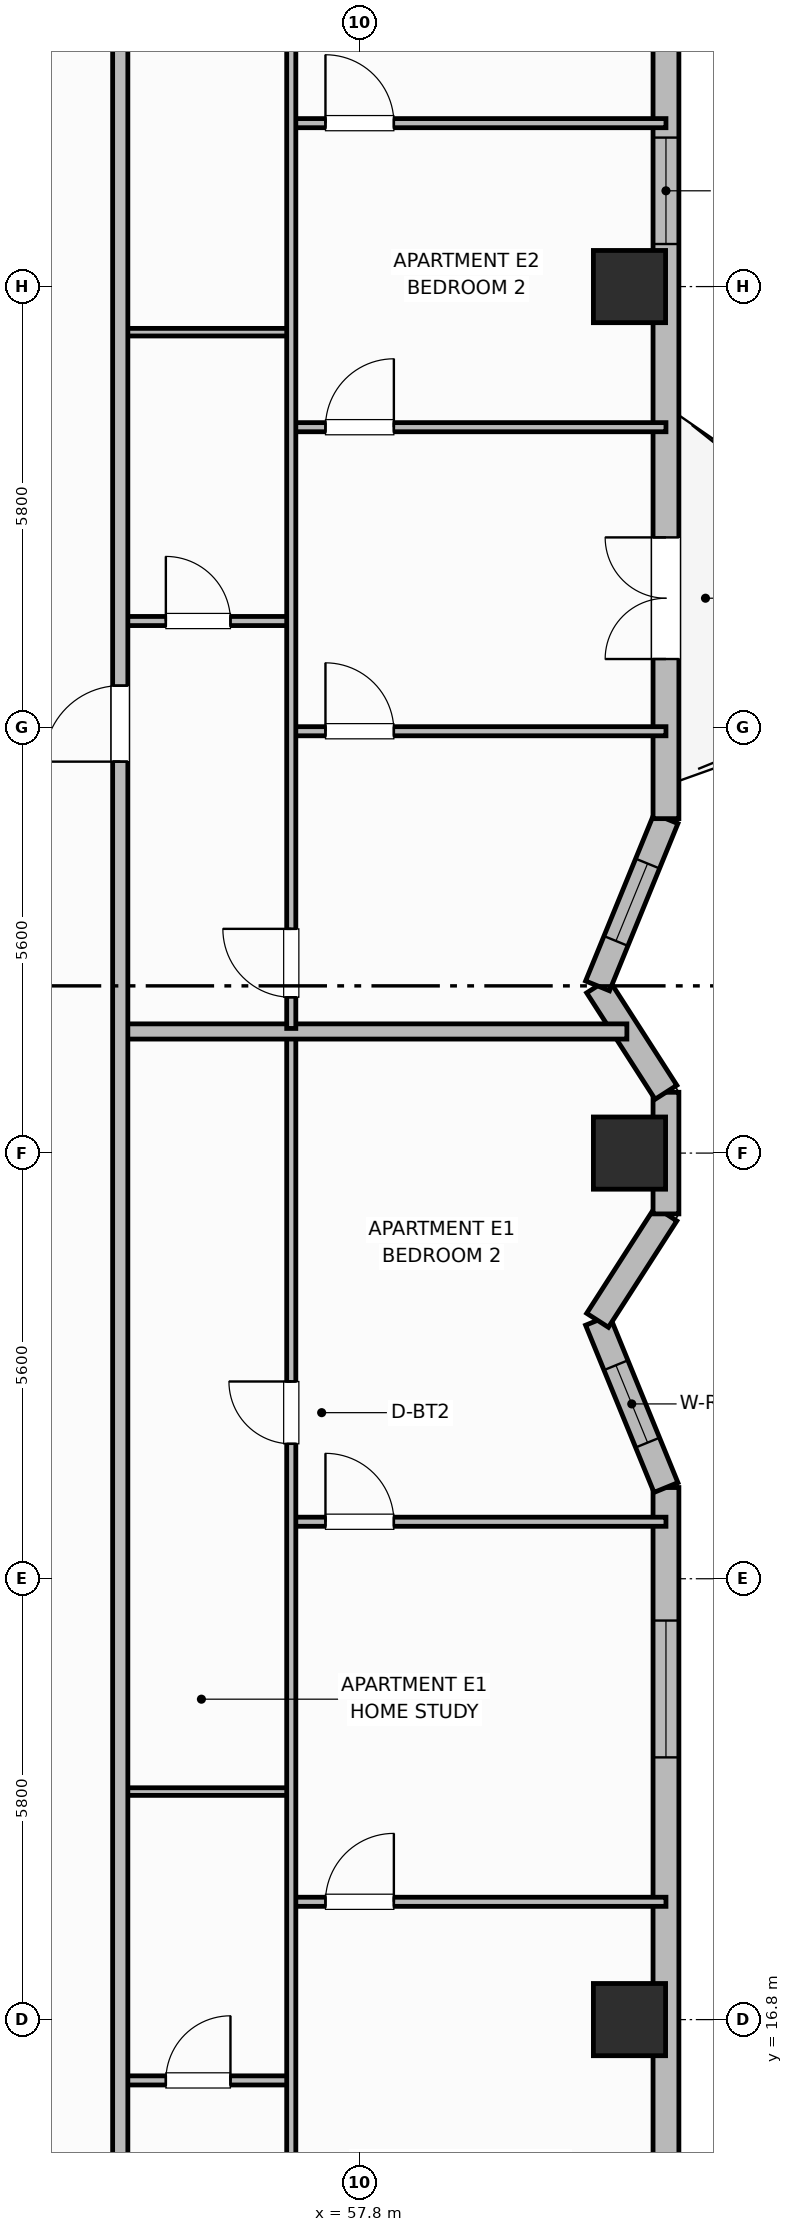
"""IFC4 building model, lengths in metres.
Left out: names, types, materials, properties, quantities, classifications, styles, units other than length and angle.
Written with IfcOpenShell. Run it as: python <this file> out.ifc"""

import sys

from ifc_helpers import new_model, si_unit, direction, frame, frame_2d, origin, origin_2d, place, context, subcontext, project, spatial, rectangle, extrude, element, fill, save


model = new_model("IFC4")
c1 = context("Model", 3, precision=1e-05, world=origin(), true_north=direction((0.0, 1.0)))
c2 = subcontext(c1, "Body", "Model", "MODEL_VIEW")
j1 = project(units=[si_unit("LENGTHUNIT", "METRE"), si_unit("PLANEANGLEUNIT", "RADIAN")], contexts=[c1])
p1 = place(None, origin())
s1 = spatial("IfcSite", under=j1, at=p1, CompositionType="ELEMENT")
p2 = place(p1, origin())
s2 = spatial("IfcBuilding", under=s1, at=p2, CompositionType="ELEMENT")
p3 = place(p2, frame((0.0, 0.0, 158.9)))
s3 = spatial("IfcBuildingStorey", under=s2, at=p3, CompositionType="ELEMENT", Elevation=158.9)
for number, where, z_axis, x_axis in (
    (1, (61.35, 16.8, 0.0), (0.0, 0.0, 1.0), (1.0, 0.0, 0.0)),
    (2, (61.35, 28.2, 0.0), (0.0, 0.0, 1.0), (1.0, 0.0, 0.0)),
    (3, (61.35, 39.6, 0.0), (0.0, 0.0, 1.0), (1.0, 0.0, 0.0)),
):
    element("IfcColumn", number, at=place(p3, frame(where, z_axis=z_axis, x_axis=x_axis)), inside=s3, PredefinedType="COLUMN", context=c2, shape_type="SweptSolid", body=[
        extrude(rectangle(XDim=0.95, YDim=0.95, at=origin_2d()), origin(), (0.0, 0.0, 1.0), 3.7),
    ])
p4 = place(p3, frame((61.83, 10.5, 0.0), z_axis=(0.0, 0.0, 1.0), x_axis=(0.0, 1.0, 0.0)))
e4 = element("IfcWall", 4, at=p4, inside=s3, PredefinedType="SOLIDWALL", context=c2, shape_type="SweptSolid", body=[
    extrude(rectangle(XDim=13.3, YDim=0.34, at=frame_2d((6.65, 0.0))), origin(), (0.0, 0.0, 1.0), 2.72),
])
p5 = place(p4, frame((1.75, 0.0, 0.75)))
e5 = element("IfcOpeningElement", 5, at=p5, cuts=e4, PredefinedType="OPENING", context=c2, shape_type="SweptSolid", body=[
    extrude(rectangle(XDim=1.8, YDim=1.85, at=frame_2d((0.9, 0.925))), frame((0.0, 0.18, 0.0), z_axis=(0.0, -1.0, 0.0), x_axis=(1.0, 0.0, 0.0)), (0.0, 0.0, 1.0), 0.36),
])
p6 = place(p4, frame((9.75, 0.0, 0.75)))
e6 = element("IfcOpeningElement", 6, at=p6, cuts=e4, PredefinedType="OPENING", context=c2, shape_type="SweptSolid", body=[
    extrude(rectangle(XDim=1.8, YDim=1.85, at=frame_2d((0.9, 0.925))), frame((0.0, 0.18, 0.0), z_axis=(0.0, -1.0, 0.0), x_axis=(1.0, 0.0, 0.0)), (0.0, 0.0, 1.0), 0.36),
])
p7 = place(p3, frame((61.83, 23.8, 0.0), z_axis=(0.0, 0.0, 1.0), x_axis=(-0.378692835005, 0.925522412865, 0.0)))
e7 = element("IfcWall", 7, at=p7, inside=s3, PredefinedType="SOLIDWALL", context=c2, shape_type="SweptSolid", body=[
    extrude(rectangle(XDim=2.377, YDim=0.34, at=frame_2d((1.188, 0.0))), origin(), (0.0, 0.0, 1.0), 2.72),
])
p8 = place(p7, frame((0.638, 0.0, 0.91)))
e8 = element("IfcOpeningElement", 8, at=p8, cuts=e7, PredefinedType="OPENING", context=c2, shape_type="SweptSolid", body=[
    extrude(rectangle(XDim=1.1, YDim=1.65, at=frame_2d((0.55, 0.825))), frame((0.0, 0.18, 0.0), z_axis=(0.0, -1.0, 0.0), x_axis=(1.0, 0.0, 0.0)), (0.0, 0.0, 1.0), 0.36),
])
p9 = place(p3, frame((60.93, 26.0, 0.0), z_axis=(0.0, 0.0, 1.0), x_axis=(0.540846555596, 0.841121277403, 0.0)))
e9 = element("IfcWall", 9, at=p9, inside=s3, PredefinedType="SOLIDWALL", context=c2, shape_type="SweptSolid", body=[
    extrude(rectangle(XDim=1.664, YDim=0.34, at=frame_2d((0.832, 0.0))), origin(), (0.0, 0.0, 1.0), 2.72),
])
p10 = place(p3, frame((61.83, 27.4, 0.0), z_axis=(0.0, 0.0, 1.0), x_axis=(0.0, 1.0, 0.0)))
e10 = element("IfcWall", 10, at=p10, inside=s3, PredefinedType="SOLIDWALL", context=c2, shape_type="SweptSolid", body=[
    extrude(rectangle(XDim=1.6, YDim=0.34, at=frame_2d((0.8, 0.0))), origin(), (0.0, 0.0, 1.0), 2.72),
])
p11 = place(p3, frame((61.83, 29.0, 0.0), z_axis=(0.0, 0.0, 1.0), x_axis=(-0.540846555596, 0.841121277403, 0.0)))
e11 = element("IfcWall", 11, at=p11, inside=s3, PredefinedType="SOLIDWALL", context=c2, shape_type="SweptSolid", body=[
    extrude(rectangle(XDim=1.664, YDim=0.34, at=frame_2d((0.832, 0.0))), origin(), (0.0, 0.0, 1.0), 2.72),
])
p12 = place(p3, frame((60.93, 30.4, 0.0), z_axis=(0.0, 0.0, 1.0), x_axis=(0.378656839344, 0.925537140269, 0.0)))
e12 = element("IfcWall", 12, at=p12, inside=s3, PredefinedType="SOLIDWALL", context=c2, shape_type="SweptSolid", body=[
    extrude(rectangle(XDim=2.377, YDim=0.34, at=frame_2d((1.188, 0.0))), origin(), (0.0, 0.0, 1.0), 2.72),
])
p13 = place(p12, frame((0.638, 0.0, 0.91)))
e13 = element("IfcOpeningElement", 13, at=p13, cuts=e12, PredefinedType="OPENING", context=c2, shape_type="SweptSolid", body=[
    extrude(rectangle(XDim=1.1, YDim=1.65, at=frame_2d((0.55, 0.825))), frame((0.0, 0.18, 0.0), z_axis=(0.0, -1.0, 0.0), x_axis=(1.0, 0.0, 0.0)), (0.0, 0.0, 1.0), 0.36),
])
p14 = place(p3, frame((61.83, 32.6, 0.0), z_axis=(0.0, 0.0, 1.0), x_axis=(0.0, 1.0, 0.0)))
e14 = element("IfcWall", 14, at=p14, inside=s3, PredefinedType="SOLIDWALL", context=c2, shape_type="SweptSolid", body=[
    extrude(rectangle(XDim=13.3, YDim=0.34, at=frame_2d((6.65, 0.0))), origin(), (0.0, 0.0, 1.0), 2.72),
])
p15 = place(p14, frame((2.1, 0.0, 0.0)))
e15 = element("IfcOpeningElement", 15, at=p15, cuts=e14, PredefinedType="OPENING", context=c2, shape_type="SweptSolid", body=[
    extrude(rectangle(XDim=1.6, YDim=2.1, at=frame_2d((0.8, 1.05))), frame((0.0, 0.18, 0.0), z_axis=(0.0, -1.0, 0.0), x_axis=(1.0, 0.0, 0.0)), (0.0, 0.0, 1.0), 0.36),
])
p16 = place(p14, frame((7.56, 0.0, 0.71)))
e16 = element("IfcOpeningElement", 16, at=p16, cuts=e14, PredefinedType="OPENING", context=c2, shape_type="SweptSolid", body=[
    extrude(rectangle(XDim=1.4, YDim=1.85, at=frame_2d((0.7, 0.925))), frame((0.0, 0.18, 0.0), z_axis=(0.0, -1.0, 0.0), x_axis=(1.0, 0.0, 0.0)), (0.0, 0.0, 1.0), 0.36),
])
p17 = place(p14, frame((10.35, 0.0, 0.7)))
e17 = element("IfcOpeningElement", 17, at=p17, cuts=e14, PredefinedType="OPENING", context=c2, shape_type="SweptSolid", body=[
    extrude(rectangle(XDim=1.6, YDim=1.9, at=frame_2d((0.8, 0.95))), frame((0.0, 0.18, 0.0), z_axis=(0.0, -1.0, 0.0), x_axis=(1.0, 0.0, 0.0)), (0.0, 0.0, 1.0), 0.36),
])
p18 = place(p3, frame((54.65, 16.0, 0.0), z_axis=(0.0, 0.0, 1.0), x_axis=(1.0, 0.0, 0.0)))
e18 = element("IfcWall", 18, at=p18, inside=s3, PredefinedType="PARTITIONING", context=c2, shape_type="SweptSolid", body=[
    extrude(rectangle(XDim=2.25, YDim=0.12, at=frame_2d((1.125, 0.0))), origin(), (0.0, 0.0, 1.0), 2.55),
])
p19 = place(p18, frame((0.6, 0.0, 0.0)))
e19 = element("IfcOpeningElement", 19, at=p19, cuts=e18, PredefinedType="OPENING", context=c2, shape_type="SweptSolid", body=[
    extrude(rectangle(XDim=0.85, YDim=2.1, at=frame_2d((0.425, 1.05))), frame((0.0, 0.07, 0.0), z_axis=(0.0, -1.0, 0.0), x_axis=(1.0, 0.0, 0.0)), (0.0, 0.0, 1.0), 0.14),
])
p20 = place(p3, frame((54.65, 19.8, 0.0), z_axis=(0.0, 0.0, 1.0), x_axis=(1.0, 0.0, 0.0)))
e20 = element("IfcWall", 20, at=p20, inside=s3, PredefinedType="PARTITIONING", context=c2, shape_type="SweptSolid", body=[
    extrude(rectangle(XDim=2.25, YDim=0.1, at=frame_2d((1.125, 0.0))), origin(), (0.0, 0.0, 1.0), 2.55),
])
p21 = place(p3, frame((56.9, 18.35, 0.0), z_axis=(0.0, 0.0, 1.0), x_axis=(1.0, 0.0, 0.0)))
e21 = element("IfcWall", 21, at=p21, inside=s3, PredefinedType="PARTITIONING", context=c2, shape_type="SweptSolid", body=[
    extrude(rectangle(XDim=4.93, YDim=0.12, at=frame_2d((2.465, 0.0))), origin(), (0.0, 0.0, 1.0), 2.55),
])
p22 = place(p21, frame((0.45, 0.0, 0.0)))
e22 = element("IfcOpeningElement", 22, at=p22, cuts=e21, PredefinedType="OPENING", context=c2, shape_type="SweptSolid", body=[
    extrude(rectangle(XDim=0.9, YDim=2.1, at=frame_2d((0.45, 1.05))), frame((0.0, 0.07, 0.0), z_axis=(0.0, -1.0, 0.0), x_axis=(1.0, 0.0, 0.0)), (0.0, 0.0, 1.0), 0.14),
])
p23 = place(p3, frame((56.9, 23.35, 0.0), z_axis=(0.0, 0.0, 1.0), x_axis=(1.0, 0.0, 0.0)))
e23 = element("IfcWall", 23, at=p23, inside=s3, PredefinedType="PARTITIONING", context=c2, shape_type="SweptSolid", body=[
    extrude(rectangle(XDim=4.93, YDim=0.12, at=frame_2d((2.465, 0.0))), origin(), (0.0, 0.0, 1.0), 2.55),
])
p24 = place(p23, frame((0.45, 0.0, 0.0)))
e24 = element("IfcOpeningElement", 24, at=p24, cuts=e23, PredefinedType="OPENING", context=c2, shape_type="SweptSolid", body=[
    extrude(rectangle(XDim=0.9, YDim=2.1, at=frame_2d((0.45, 1.05))), frame((0.0, 0.07, 0.0), z_axis=(0.0, -1.0, 0.0), x_axis=(1.0, 0.0, 0.0)), (0.0, 0.0, 1.0), 0.14),
])
p25 = place(p3, frame((56.9, 10.64, 0.0), z_axis=(0.0, 0.0, 1.0), x_axis=(0.0, 1.0, 0.0)))
e25 = element("IfcWall", 25, at=p25, inside=s3, PredefinedType="PARTITIONING", context=c2, shape_type="SweptSolid", body=[
    extrude(rectangle(XDim=19.12, YDim=0.12, at=frame_2d((9.56, 0.0))), origin(), (0.0, 0.0, 1.0), 2.55),
])
p26 = place(p25, frame((0.41, 0.0, 0.0)))
e26 = element("IfcOpeningElement", 26, at=p26, cuts=e25, PredefinedType="OPENING", context=c2, shape_type="SweptSolid", body=[
    extrude(rectangle(XDim=0.9, YDim=2.1, at=frame_2d((0.45, 1.05))), frame((0.0, 0.07, 0.0), z_axis=(0.0, -1.0, 0.0), x_axis=(1.0, 0.0, 0.0)), (0.0, 0.0, 1.0), 0.14),
])
p27 = place(p25, frame((13.735, 0.0, 0.0)))
e27 = element("IfcOpeningElement", 27, at=p27, cuts=e25, PredefinedType="OPENING", context=c2, shape_type="SweptSolid", body=[
    extrude(rectangle(XDim=0.82, YDim=2.08, at=frame_2d((0.41, 1.04))), frame((0.0, 0.07, 0.0), z_axis=(0.0, -1.0, 0.0), x_axis=(1.0, 0.0, 0.0)), (0.0, 0.0, 1.0), 0.14),
])
p28 = place(p3, frame((54.65, 29.8, 0.0), z_axis=(0.0, 0.0, 1.0), x_axis=(1.0, 0.0, 0.0)))
e28 = element("IfcWall", 28, at=p28, inside=s3, PredefinedType="PARTITIONING", context=c2, shape_type="SweptSolid", body=[
    extrude(rectangle(XDim=6.666, YDim=0.2, at=frame_2d((3.333, 0.0))), origin(), (0.0, 0.0, 1.0), 2.55),
])
p29 = place(p3, frame((54.65, 35.2, 0.0), z_axis=(0.0, 0.0, 1.0), x_axis=(1.0, 0.0, 0.0)))
e29 = element("IfcWall", 29, at=p29, inside=s3, PredefinedType="PARTITIONING", context=c2, shape_type="SweptSolid", body=[
    extrude(rectangle(XDim=2.25, YDim=0.12, at=frame_2d((1.125, 0.0))), origin(), (0.0, 0.0, 1.0), 2.55),
])
p30 = place(p29, frame((0.6, 0.0, 0.0)))
e30 = element("IfcOpeningElement", 30, at=p30, cuts=e29, PredefinedType="OPENING", context=c2, shape_type="SweptSolid", body=[
    extrude(rectangle(XDim=0.85, YDim=2.1, at=frame_2d((0.425, 1.05))), frame((0.0, 0.07, 0.0), z_axis=(0.0, -1.0, 0.0), x_axis=(1.0, 0.0, 0.0)), (0.0, 0.0, 1.0), 0.14),
])
p31 = place(p3, frame((54.65, 39.0, 0.0), z_axis=(0.0, 0.0, 1.0), x_axis=(1.0, 0.0, 0.0)))
e31 = element("IfcWall", 31, at=p31, inside=s3, PredefinedType="PARTITIONING", context=c2, shape_type="SweptSolid", body=[
    extrude(rectangle(XDim=2.25, YDim=0.1, at=frame_2d((1.125, 0.0))), origin(), (0.0, 0.0, 1.0), 2.55),
])
p32 = place(p3, frame((56.9, 33.75, 0.0), z_axis=(0.0, 0.0, 1.0), x_axis=(1.0, 0.0, 0.0)))
e32 = element("IfcWall", 32, at=p32, inside=s3, PredefinedType="PARTITIONING", context=c2, shape_type="SweptSolid", body=[
    extrude(rectangle(XDim=4.93, YDim=0.12, at=frame_2d((2.465, 0.0))), origin(), (0.0, 0.0, 1.0), 2.55),
])
p33 = place(p32, frame((0.45, 0.0, 0.0)))
e33 = element("IfcOpeningElement", 33, at=p33, cuts=e32, PredefinedType="OPENING", context=c2, shape_type="SweptSolid", body=[
    extrude(rectangle(XDim=0.9, YDim=2.1, at=frame_2d((0.45, 1.05))), frame((0.0, 0.07, 0.0), z_axis=(0.0, -1.0, 0.0), x_axis=(1.0, 0.0, 0.0)), (0.0, 0.0, 1.0), 0.14),
])
p34 = place(p3, frame((56.9, 37.75, 0.0), z_axis=(0.0, 0.0, 1.0), x_axis=(1.0, 0.0, 0.0)))
e34 = element("IfcWall", 34, at=p34, inside=s3, PredefinedType="PARTITIONING", context=c2, shape_type="SweptSolid", body=[
    extrude(rectangle(XDim=4.93, YDim=0.12, at=frame_2d((2.465, 0.0))), origin(), (0.0, 0.0, 1.0), 2.55),
])
p35 = place(p34, frame((0.45, 0.0, 0.0)))
e35 = element("IfcOpeningElement", 35, at=p35, cuts=e34, PredefinedType="OPENING", context=c2, shape_type="SweptSolid", body=[
    extrude(rectangle(XDim=0.9, YDim=2.1, at=frame_2d((0.45, 1.05))), frame((0.0, 0.07, 0.0), z_axis=(0.0, -1.0, 0.0), x_axis=(1.0, 0.0, 0.0)), (0.0, 0.0, 1.0), 0.14),
])
p36 = place(p3, frame((56.9, 41.75, 0.0), z_axis=(0.0, 0.0, 1.0), x_axis=(1.0, 0.0, 0.0)))
e36 = element("IfcWall", 36, at=p36, inside=s3, PredefinedType="PARTITIONING", context=c2, shape_type="SweptSolid", body=[
    extrude(rectangle(XDim=4.93, YDim=0.12, at=frame_2d((2.465, 0.0))), origin(), (0.0, 0.0, 1.0), 2.55),
])
p37 = place(p36, frame((0.45, 0.0, 0.0)))
e37 = element("IfcOpeningElement", 37, at=p37, cuts=e36, PredefinedType="OPENING", context=c2, shape_type="SweptSolid", body=[
    extrude(rectangle(XDim=0.9, YDim=2.1, at=frame_2d((0.45, 1.05))), frame((0.0, 0.07, 0.0), z_axis=(0.0, -1.0, 0.0), x_axis=(1.0, 0.0, 0.0)), (0.0, 0.0, 1.0), 0.14),
])
p38 = place(p3, frame((56.9, 29.84, 0.0), z_axis=(0.0, 0.0, 1.0), x_axis=(0.0, 1.0, 0.0)))
e38 = element("IfcWall", 38, at=p38, inside=s3, PredefinedType="PARTITIONING", context=c2, shape_type="SweptSolid", body=[
    extrude(rectangle(XDim=15.92, YDim=0.12, at=frame_2d((7.96, 0.0))), origin(), (0.0, 0.0, 1.0), 2.55),
])
p39 = place(p38, frame((0.41, 0.0, 0.0)))
e39 = element("IfcOpeningElement", 39, at=p39, cuts=e38, PredefinedType="OPENING", context=c2, shape_type="SweptSolid", body=[
    extrude(rectangle(XDim=0.9, YDim=2.1, at=frame_2d((0.45, 1.05))), frame((0.0, 0.07, 0.0), z_axis=(0.0, -1.0, 0.0), x_axis=(1.0, 0.0, 0.0)), (0.0, 0.0, 1.0), 0.14),
])
p40 = place(p38, frame((13.125, 0.0, 0.0)))
e40 = element("IfcOpeningElement", 40, at=p40, cuts=e38, PredefinedType="OPENING", context=c2, shape_type="SweptSolid", body=[
    extrude(rectangle(XDim=0.82, YDim=2.08, at=frame_2d((0.41, 1.04))), frame((0.0, 0.07, 0.0), z_axis=(0.0, -1.0, 0.0), x_axis=(1.0, 0.0, 0.0)), (0.0, 0.0, 1.0), 0.14),
])
p41 = place(p3, frame((54.65, 10.6, 0.0), z_axis=(0.0, 0.0, 1.0), x_axis=(0.0, 1.0, 0.0)))
e41 = element("IfcWall", 41, at=p41, inside=s3, PredefinedType="PARTITIONING", context=c2, shape_type="SweptSolid", body=[
    extrude(rectangle(XDim=35.2, YDim=0.2, at=frame_2d((17.6, 0.0))), origin(), (0.0, 0.0, 1.0), 2.55),
])
p42 = place(p41, frame((2.65, 0.0, 0.0)))
e42 = element("IfcOpeningElement", 42, at=p42, cuts=e41, PredefinedType="OPENING", context=c2, shape_type="SweptSolid", body=[
    extrude(rectangle(XDim=1.0, YDim=2.15, at=frame_2d((0.5, 1.075))), frame((0.0, 0.11, 0.0), z_axis=(0.0, -1.0, 0.0), x_axis=(1.0, 0.0, 0.0)), (0.0, 0.0, 1.0), 0.22),
])
p43 = place(p41, frame((22.75, 0.0, 0.0)))
e43 = element("IfcOpeningElement", 43, at=p43, cuts=e41, PredefinedType="OPENING", context=c2, shape_type="SweptSolid", body=[
    extrude(rectangle(XDim=1.0, YDim=2.15, at=frame_2d((0.5, 1.075))), frame((0.0, 0.11, 0.0), z_axis=(0.0, -1.0, 0.0), x_axis=(1.0, 0.0, 0.0)), (0.0, 0.0, 1.0), 0.22),
])
p44 = place(p6, origin())
e44 = element("IfcWindow", 44, at=p44, inside=s3, PartitioningType="SINGLE_PANEL", PredefinedType="WINDOW", context=c2, shape_type="SweptSolid", body=[
    extrude(rectangle(XDim=1.8, YDim=1.85, at=frame_2d((0.9, 0.925))), frame((0.0, 0.03, 0.0), z_axis=(0.0, -1.0, 0.0), x_axis=(1.0, 0.0, 0.0)), (0.0, 0.0, 1.0), 0.06),
])
fill(e6, e44)
p45 = place(p8, origin())
e45 = element("IfcWindow", 45, at=p45, inside=s3, PartitioningType="SINGLE_PANEL", PredefinedType="WINDOW", context=c2, shape_type="SweptSolid", body=[
    extrude(rectangle(XDim=1.1, YDim=1.65, at=frame_2d((0.55, 0.825))), frame((0.0, 0.03, 0.0), z_axis=(0.0, -1.0, 0.0), x_axis=(1.0, 0.0, 0.0)), (0.0, 0.0, 1.0), 0.06),
])
fill(e8, e45)
p46 = place(p13, origin())
e46 = element("IfcWindow", 46, at=p46, inside=s3, PartitioningType="SINGLE_PANEL", PredefinedType="WINDOW", context=c2, shape_type="SweptSolid", body=[
    extrude(rectangle(XDim=1.1, YDim=1.65, at=frame_2d((0.55, 0.825))), frame((0.0, 0.03, 0.0), z_axis=(0.0, -1.0, 0.0), x_axis=(1.0, 0.0, 0.0)), (0.0, 0.0, 1.0), 0.06),
])
fill(e13, e46)
p47 = place(p15, origin())
e47 = element("IfcDoor", 47, at=p47, inside=s3, OperationType="DOUBLE_DOOR_SINGLE_SWING", PredefinedType="DOOR", context=c2, shape_type="SweptSolid", body=[
    extrude(rectangle(XDim=1.6, YDim=2.1, at=frame_2d((0.8, 1.05))), frame((0.0, 0.025, 0.0), z_axis=(0.0, -1.0, 0.0), x_axis=(1.0, 0.0, 0.0)), (0.0, 0.0, 1.0), 0.05),
])
fill(e15, e47)
p48 = place(p16, origin())
e48 = element("IfcWindow", 48, at=p48, inside=s3, PartitioningType="SINGLE_PANEL", PredefinedType="WINDOW", context=c2, shape_type="SweptSolid", body=[
    extrude(rectangle(XDim=1.4, YDim=1.85, at=frame_2d((0.7, 0.925))), frame((0.0, 0.03, 0.0), z_axis=(0.0, -1.0, 0.0), x_axis=(1.0, 0.0, 0.0)), (0.0, 0.0, 1.0), 0.06),
])
fill(e16, e48)
p49 = place(p19, origin())
e49 = element("IfcDoor", 49, at=p49, inside=s3, OperationType="SINGLE_SWING_RIGHT", PredefinedType="DOOR", context=c2, shape_type="SweptSolid", body=[
    extrude(rectangle(XDim=0.85, YDim=2.1, at=frame_2d((0.425, 1.05))), frame((0.0, 0.025, 0.0), z_axis=(0.0, -1.0, 0.0), x_axis=(1.0, 0.0, 0.0)), (0.0, 0.0, 1.0), 0.05),
])
fill(e19, e49)
p50 = place(p22, origin())
e50 = element("IfcDoor", 50, at=p50, inside=s3, OperationType="SINGLE_SWING_RIGHT", PredefinedType="DOOR", context=c2, shape_type="SweptSolid", body=[
    extrude(rectangle(XDim=0.9, YDim=2.1, at=frame_2d((0.45, 1.05))), frame((0.0, 0.025, 0.0), z_axis=(0.0, -1.0, 0.0), x_axis=(1.0, 0.0, 0.0)), (0.0, 0.0, 1.0), 0.05),
])
fill(e22, e50)
p51 = place(p24, origin())
e51 = element("IfcDoor", 51, at=p51, inside=s3, OperationType="SINGLE_SWING_LEFT", PredefinedType="DOOR", context=c2, shape_type="SweptSolid", body=[
    extrude(rectangle(XDim=0.9, YDim=2.1, at=frame_2d((0.45, 1.05))), frame((0.0, 0.025, 0.0), z_axis=(0.0, -1.0, 0.0), x_axis=(1.0, 0.0, 0.0)), (0.0, 0.0, 1.0), 0.05),
])
fill(e24, e51)
p52 = place(p27, origin())
e52 = element("IfcDoor", 52, at=p52, inside=s3, OperationType="SINGLE_SWING_RIGHT", PredefinedType="DOOR", context=c2, shape_type="SweptSolid", body=[
    extrude(rectangle(XDim=0.82, YDim=2.08, at=frame_2d((0.41, 1.04))), frame((0.0, 0.025, 0.0), z_axis=(0.0, -1.0, 0.0), x_axis=(1.0, 0.0, 0.0)), (0.0, 0.0, 1.0), 0.05),
])
fill(e27, e52)
p53 = place(p30, origin())
e53 = element("IfcDoor", 53, at=p53, inside=s3, OperationType="SINGLE_SWING_LEFT", PredefinedType="DOOR", context=c2, shape_type="SweptSolid", body=[
    extrude(rectangle(XDim=0.85, YDim=2.1, at=frame_2d((0.425, 1.05))), frame((0.0, 0.025, 0.0), z_axis=(0.0, -1.0, 0.0), x_axis=(1.0, 0.0, 0.0)), (0.0, 0.0, 1.0), 0.05),
])
fill(e30, e53)
p54 = place(p33, origin())
e54 = element("IfcDoor", 54, at=p54, inside=s3, OperationType="SINGLE_SWING_LEFT", PredefinedType="DOOR", context=c2, shape_type="SweptSolid", body=[
    extrude(rectangle(XDim=0.9, YDim=2.1, at=frame_2d((0.45, 1.05))), frame((0.0, 0.025, 0.0), z_axis=(0.0, -1.0, 0.0), x_axis=(1.0, 0.0, 0.0)), (0.0, 0.0, 1.0), 0.05),
])
fill(e33, e54)
p55 = place(p35, origin())
e55 = element("IfcDoor", 55, at=p55, inside=s3, OperationType="SINGLE_SWING_RIGHT", PredefinedType="DOOR", context=c2, shape_type="SweptSolid", body=[
    extrude(rectangle(XDim=0.9, YDim=2.1, at=frame_2d((0.45, 1.05))), frame((0.0, 0.025, 0.0), z_axis=(0.0, -1.0, 0.0), x_axis=(1.0, 0.0, 0.0)), (0.0, 0.0, 1.0), 0.05),
])
fill(e35, e55)
p56 = place(p37, origin())
e56 = element("IfcDoor", 56, at=p56, inside=s3, OperationType="SINGLE_SWING_LEFT", PredefinedType="DOOR", context=c2, shape_type="SweptSolid", body=[
    extrude(rectangle(XDim=0.9, YDim=2.1, at=frame_2d((0.45, 1.05))), frame((0.0, 0.025, 0.0), z_axis=(0.0, -1.0, 0.0), x_axis=(1.0, 0.0, 0.0)), (0.0, 0.0, 1.0), 0.05),
])
fill(e37, e56)
p57 = place(p39, origin())
e57 = element("IfcDoor", 57, at=p57, inside=s3, OperationType="SINGLE_SWING_RIGHT", PredefinedType="DOOR", context=c2, shape_type="SweptSolid", body=[
    extrude(rectangle(XDim=0.9, YDim=2.1, at=frame_2d((0.45, 1.05))), frame((0.0, 0.025, 0.0), z_axis=(0.0, -1.0, 0.0), x_axis=(1.0, 0.0, 0.0)), (0.0, 0.0, 1.0), 0.05),
])
fill(e39, e57)
p58 = place(p43, origin())
e58 = element("IfcDoor", 58, at=p58, inside=s3, OperationType="SINGLE_SWING_LEFT", PredefinedType="DOOR", context=c2, shape_type="SweptSolid", body=[
    extrude(rectangle(XDim=1.0, YDim=2.15, at=frame_2d((0.5, 1.075))), frame((0.0, 0.025, 0.0), z_axis=(0.0, -1.0, 0.0), x_axis=(1.0, 0.0, 0.0)), (0.0, 0.0, 1.0), 0.05),
])
fill(e43, e58)
save(model, sys.argv[1])
